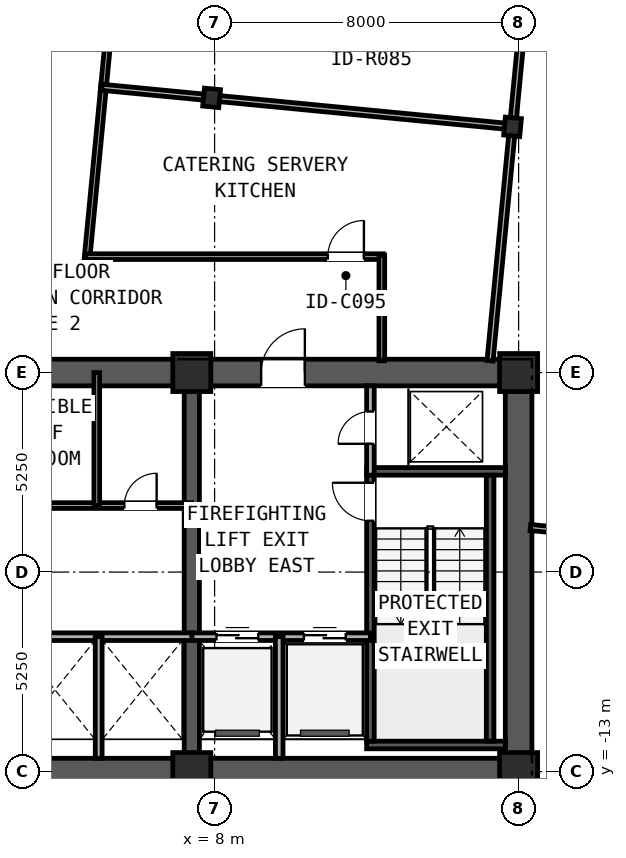
"""IFC4 building model, lengths in metres.
Left out: names, types, materials, properties, quantities, classifications, styles, units other than length and angle.
Written with IfcOpenShell. Run it as: python <this file> out.ifc"""

import sys

from ifc_helpers import new_model, si_unit, direction, frame, frame_2d, origin, origin_2d, place, context, subcontext, project, spatial, rectangle, i_section, extrude, element, fill, save


model = new_model("IFC4")
c1 = context("Model", 3, precision=1e-05, world=origin(), true_north=direction((0.0, 1.0)))
c2 = subcontext(c1, "Body", "Model", "MODEL_VIEW")
j1 = project(units=[si_unit("LENGTHUNIT", "METRE"), si_unit("PLANEANGLEUNIT", "RADIAN")], contexts=[c1])
p1 = place(None, origin())
s1 = spatial("IfcSite", under=j1, at=p1, CompositionType="ELEMENT")
p2 = place(p1, origin())
s2 = spatial("IfcBuilding", under=s1, at=p2, CompositionType="ELEMENT")
p3 = place(p2, frame((0.0, 0.0, 160.05)))
s3 = spatial("IfcBuildingStorey", under=s2, at=p3, CompositionType="ELEMENT", Elevation=160.05)
p4 = place(p3, frame((-16.35, -13.0, 0.0), z_axis=(0.0, 0.0, 1.0), x_axis=(1.0, 0.0, 0.0)))
e1 = element("IfcWall", 1, at=p4, inside=s3, PredefinedType="SHEAR", context=c2, shape_type="SweptSolid", body=[
    extrude(rectangle(XDim=32.7, YDim=0.7, at=frame_2d((16.35, 0.0))), origin(), (0.0, 0.0, 1.0), 2.91),
])
p5 = place(p3, frame((-16.35, -2.5, 0.0), z_axis=(0.0, 0.0, 1.0), x_axis=(1.0, 0.0, 0.0)))
e2 = element("IfcWall", 2, at=p5, inside=s3, PredefinedType="SHEAR", context=c2, shape_type="SweptSolid", body=[
    extrude(rectangle(XDim=32.7, YDim=0.7, at=frame_2d((16.35, 0.0))), origin(), (0.0, 0.0, 1.0), 2.91),
])
p6 = place(p5, frame((5.975, 0.0, 0.0)))
e3 = element("IfcOpeningElement", 3, at=p6, cuts=e2, PredefinedType="OPENING", context=c2, shape_type="SweptSolid", body=[
    extrude(rectangle(XDim=1.15, YDim=2.0, at=frame_2d((0.575, 1.0))), frame((0.0, 0.36, 0.0), z_axis=(0.0, -1.0, 0.0), x_axis=(1.0, 0.0, 0.0)), (0.0, 0.0, 1.0), 0.72),
])
p7 = place(p5, frame((15.55, 0.0, 0.0)))
e4 = element("IfcOpeningElement", 4, at=p7, cuts=e2, PredefinedType="OPENING", context=c2, shape_type="SweptSolid", body=[
    extrude(rectangle(XDim=1.6, YDim=2.0, at=frame_2d((0.8, 1.0))), frame((0.0, 0.36, 0.0), z_axis=(0.0, -1.0, 0.0), x_axis=(1.0, 0.0, 0.0)), (0.0, 0.0, 1.0), 0.72),
])
p8 = place(p5, frame((25.575, 0.0, 0.0)))
e5 = element("IfcOpeningElement", 5, at=p8, cuts=e2, PredefinedType="OPENING", context=c2, shape_type="SweptSolid", body=[
    extrude(rectangle(XDim=1.15, YDim=2.0, at=frame_2d((0.575, 1.0))), frame((0.0, 0.36, 0.0), z_axis=(0.0, -1.0, 0.0), x_axis=(1.0, 0.0, 0.0)), (0.0, 0.0, 1.0), 0.72),
])
p9 = place(p3, frame((16.0, -12.65, 0.0), z_axis=(0.0, 0.0, 1.0), x_axis=(0.0, 1.0, 0.0)))
e6 = element("IfcWall", 6, at=p9, inside=s3, PredefinedType="SHEAR", context=c2, shape_type="SweptSolid", body=[
    extrude(rectangle(XDim=9.8, YDim=0.7, at=frame_2d((4.9, 0.0))), origin(), (0.0, 0.0, 1.0), 2.91),
])
p10 = place(p3, frame((7.4, -12.65, 0.0), z_axis=(0.0, 0.0, 1.0), x_axis=(0.0, 1.0, 0.0)))
e7 = element("IfcWall", 7, at=p10, inside=s3, PredefinedType="SHEAR", context=c2, shape_type="SweptSolid", body=[
    extrude(rectangle(XDim=9.8, YDim=0.4, at=frame_2d((4.9, 0.0))), origin(), (0.0, 0.0, 1.0), 3.19),
])
for number, where, z_axis, x_axis in (
    (8, (12.0, -12.3, 0.0), (0.0, 0.0, 1.0), (1.0, 0.0, 0.0)),
    (9, (12.0, -5.1, 0.0), (0.0, 0.0, 1.0), (1.0, 0.0, 0.0)),
):
    element("IfcWall", number, at=place(p3, frame(where, z_axis=z_axis, x_axis=x_axis)), inside=s3, PredefinedType="SOLIDWALL", context=c2, shape_type="SweptSolid", body=[
        extrude(rectangle(XDim=3.65, YDim=0.2, at=frame_2d((1.825, 0.0))), origin(), (0.0, 0.0, 1.0), 3.19),
    ])
p11 = place(p3, frame((12.1, -12.2, 0.0), z_axis=(0.0, 0.0, 1.0), x_axis=(0.0, 1.0, 0.0)))
e10 = element("IfcWall", 10, at=p11, inside=s3, PredefinedType="SOLIDWALL", context=c2, shape_type="SweptSolid", body=[
    extrude(rectangle(XDim=7.0, YDim=0.2, at=frame_2d((3.5, 0.0))), origin(), (0.0, 0.0, 1.0), 3.19),
])
p12 = place(p11, frame((5.8, 0.0, 0.0)))
e11 = element("IfcOpeningElement", 11, at=p12, cuts=e10, PredefinedType="OPENING", context=c2, shape_type="SweptSolid", body=[
    extrude(rectangle(XDim=1.0, YDim=2.1, at=frame_2d((0.5, 1.05))), frame((0.0, 0.11, 0.0), z_axis=(0.0, -1.0, 0.0), x_axis=(1.0, 0.0, 0.0)), (0.0, 0.0, 1.0), 0.22),
])
p13 = place(p3, frame((15.25, -12.2, 0.0), z_axis=(0.0, 0.0, 1.0), x_axis=(0.0, 1.0, 0.0)))
e12 = element("IfcWall", 12, at=p13, inside=s3, PredefinedType="SOLIDWALL", context=c2, shape_type="SweptSolid", body=[
    extrude(rectangle(XDim=7.0, YDim=0.2, at=frame_2d((3.5, 0.0))), origin(), (0.0, 0.0, 1.0), 3.19),
])
for number, where, z_axis, x_axis in (
    (13, (7.4, -13.0, 0.0), (0.0, 0.0, 1.0), (1.0, 0.0, 0.0)),
    (14, (16.0, -13.0, 0.0), (0.0, 0.0, 1.0), (1.0, 0.0, 0.0)),
    (15, (7.4, -2.5, 0.0), (0.0, 0.0, 1.0), (1.0, 0.0, 0.0)),
    (16, (16.0, -2.5, 0.0), (0.0, 0.0, 1.0), (1.0, 0.0, 0.0)),
):
    element("IfcColumn", number, at=place(p3, frame(where, z_axis=z_axis, x_axis=x_axis)), inside=s3, PredefinedType="COLUMN", context=c2, shape_type="SweptSolid", body=[
        extrude(rectangle(XDim=1.0, YDim=1.0, at=origin_2d()), origin(), (0.0, 0.0, 1.0), 3.45),
    ])
for number, where, z_axis, x_axis in (
    (17, (7.921, 4.728, 0.0), (0.0, 0.0, 1.0), (0.995, -0.096, 0.0)),
    (18, (15.84, 3.965, 0.0), (0.0, 0.0, 1.0), (0.995, -0.096, 0.0)),
):
    element("IfcColumn", number, at=place(p3, frame(where, z_axis=z_axis, x_axis=x_axis)), inside=s3, PredefinedType="COLUMN", context=c2, shape_type="SweptSolid", body=[
        extrude(i_section(OverallWidth=0.424, OverallDepth=0.474, WebThickness=0.048, FlangeThickness=0.077, FilletRadius=0.031, at=origin_2d()), origin(), (0.0, 0.0, 1.0), 3.45),
    ])
p14 = place(p3, frame((-26.695, -13.016, 0.0), z_axis=(0.0, 0.0, 1.0), x_axis=(0.995396268366, -0.095845025554, 0.0)))
e19 = element("IfcWall", 19, at=p14, inside=s3, PredefinedType="STANDARD", context=c2, shape_type="SweptSolid", body=[
    extrude(rectangle(XDim=49.6, YDim=0.24, at=frame_2d((24.8, 0.0))), origin(), (0.0, 0.0, 1.0), 3.19),
])
p15 = place(p14, frame((6.044, 0.0, 0.7)))
e20 = element("IfcOpeningElement", 20, at=p15, cuts=e19, PredefinedType="OPENING", context=c2, shape_type="SweptSolid", body=[
    extrude(rectangle(XDim=1.8, YDim=1.5, at=frame_2d((0.9, 0.75))), frame((0.0, 0.13, 0.0), z_axis=(0.0, -1.0, 0.0), x_axis=(1.0, 0.0, 0.0)), (0.0, 0.0, 1.0), 0.26),
])
p16 = place(p14, frame((41.756, 0.0, 0.7)))
e21 = element("IfcOpeningElement", 21, at=p16, cuts=e19, PredefinedType="OPENING", context=c2, shape_type="SweptSolid", body=[
    extrude(rectangle(XDim=1.8, YDim=1.5, at=frame_2d((0.9, 0.75))), frame((0.0, 0.13, 0.0), z_axis=(0.0, -1.0, 0.0), x_axis=(1.0, 0.0, 0.0)), (0.0, 0.0, 1.0), 0.26),
])
p17 = place(p3, frame((12.1, -5.2, 0.0), z_axis=(0.0, 0.0, 1.0), x_axis=(0.0, 1.0, 0.0)))
e22 = element("IfcWall", 22, at=p17, inside=s3, PredefinedType="PARTITIONING", context=c2, shape_type="SweptSolid", body=[
    extrude(rectangle(XDim=2.35, YDim=0.2, at=frame_2d((1.175, 0.0))), origin(), (0.0, 0.0, 1.0), 2.225),
])
p18 = place(p17, frame((0.825, 0.0, 0.0)))
e23 = element("IfcOpeningElement", 23, at=p18, cuts=e22, PredefinedType="OPENING", context=c2, shape_type="SweptSolid", body=[
    extrude(rectangle(XDim=0.85, YDim=2.05, at=frame_2d((0.425, 1.025))), frame((0.0, 0.11, 0.0), z_axis=(0.0, -1.0, 0.0), x_axis=(1.0, 0.0, 0.0)), (0.0, 0.0, 1.0), 0.22),
])
p19 = place(p3, frame((7.4, -9.45, 0.0), z_axis=(0.0, 0.0, 1.0), x_axis=(1.0, 0.0, 0.0)))
e24 = element("IfcWall", 24, at=p19, inside=s3, PredefinedType="PARTITIONING", context=c2, shape_type="SweptSolid", body=[
    extrude(rectangle(XDim=4.7, YDim=0.2, at=frame_2d((2.35, 0.0))), origin(), (0.0, 0.0, 1.0), 3.19),
])
p20 = place(p19, frame((2.95, 0.0, 0.0)))
e25 = element("IfcOpeningElement", 25, at=p20, cuts=e24, PredefinedType="OPENING", context=c2, shape_type="SweptSolid", body=[
    extrude(rectangle(XDim=1.1, YDim=2.2, at=frame_2d((0.55, 1.1))), frame((0.0, 0.11, 0.0), z_axis=(0.0, -1.0, 0.0), x_axis=(1.0, 0.0, 0.0)), (0.0, 0.0, 1.0), 0.22),
])
p21 = place(p19, frame((0.65, 0.0, 0.0)))
e26 = element("IfcOpeningElement", 26, at=p21, cuts=e24, PredefinedType="OPENING", context=c2, shape_type="SweptSolid", body=[
    extrude(rectangle(XDim=1.1, YDim=2.2, at=frame_2d((0.55, 1.1))), frame((0.0, 0.11, 0.0), z_axis=(0.0, -1.0, 0.0), x_axis=(1.0, 0.0, 0.0)), (0.0, 0.0, 1.0), 0.22),
])
p22 = place(p3, frame((9.7, -12.65, 0.0), z_axis=(0.0, 0.0, 1.0), x_axis=(0.0, 1.0, 0.0)))
e27 = element("IfcWall", 27, at=p22, inside=s3, PredefinedType="PARTITIONING", context=c2, shape_type="SweptSolid", body=[
    extrude(rectangle(XDim=3.2, YDim=0.2, at=frame_2d((1.6, 0.0))), origin(), (0.0, 0.0, 1.0), 2.225),
])
p23 = place(p3, frame((2.55, -9.45, 0.0), z_axis=(0.0, 0.0, 1.0), x_axis=(1.0, 0.0, 0.0)))
e28 = element("IfcWall", 28, at=p23, inside=s3, PredefinedType="PARTITIONING", context=c2, shape_type="SweptSolid", body=[
    extrude(rectangle(XDim=4.85, YDim=0.2, at=frame_2d((2.425, 0.0))), origin(), (0.0, 0.0, 1.0), 3.19),
])
p24 = place(p3, frame((4.95, -12.65, 0.0), z_axis=(0.0, 0.0, 1.0), x_axis=(0.0, 1.0, 0.0)))
e29 = element("IfcWall", 29, at=p24, inside=s3, PredefinedType="PARTITIONING", context=c2, shape_type="SweptSolid", body=[
    extrude(rectangle(XDim=3.2, YDim=0.18, at=frame_2d((1.6, 0.0))), origin(), (0.0, 0.0, 1.0), 2.225),
])
p25 = place(p3, frame((1.6, -6.0, 0.0), z_axis=(0.0, 0.0, 1.0), x_axis=(1.0, 0.0, 0.0)))
e30 = element("IfcWall", 30, at=p25, inside=s3, PredefinedType="PARTITIONING", context=c2, shape_type="SweptSolid", body=[
    extrude(rectangle(XDim=5.8, YDim=0.15, at=frame_2d((2.9, 0.0))), origin(), (0.0, 0.0, 1.0), 3.19),
])
p26 = place(p25, frame((1.2, 0.0, 0.0)))
e31 = element("IfcOpeningElement", 31, at=p26, cuts=e30, PredefinedType="OPENING", context=c2, shape_type="SweptSolid", body=[
    extrude(rectangle(XDim=0.9, YDim=2.1, at=frame_2d((0.45, 1.05))), frame((0.0, 0.085, 0.0), z_axis=(0.0, -1.0, 0.0), x_axis=(1.0, 0.0, 0.0)), (0.0, 0.0, 1.0), 0.17),
])
p27 = place(p25, frame((4.025, 0.0, 0.0)))
e32 = element("IfcOpeningElement", 32, at=p27, cuts=e30, PredefinedType="OPENING", context=c2, shape_type="SweptSolid", body=[
    extrude(rectangle(XDim=0.85, YDim=2.05, at=frame_2d((0.425, 1.025))), frame((0.0, 0.085, 0.0), z_axis=(0.0, -1.0, 0.0), x_axis=(1.0, 0.0, 0.0)), (0.0, 0.0, 1.0), 0.17),
])
p28 = place(p3, frame((4.9, -6.0, 0.0), z_axis=(0.0, 0.0, 1.0), x_axis=(0.0, 1.0, 0.0)))
e33 = element("IfcWall", 33, at=p28, inside=s3, PredefinedType="PARTITIONING", context=c2, shape_type="SweptSolid", body=[
    extrude(rectangle(XDim=3.5, YDim=0.15, at=frame_2d((1.75, 0.0))), origin(), (0.0, 0.0, 1.0), 2.225),
])
p29 = place(p3, frame((5.314, 7.48, 0.0), z_axis=(0.0, 0.0, 1.0), x_axis=(-0.09587519517, -0.995393362923, 0.0)))
e34 = element("IfcWall", 34, at=p29, inside=s3, PredefinedType="PARTITIONING", context=c2, shape_type="SweptSolid", body=[
    extrude(rectangle(XDim=2.572, YDim=0.15, at=frame_2d((1.286, 0.0))), origin(), (0.0, 0.0, 1.0), 2.479),
])
p30 = place(p3, frame((5.084, 5.083, 0.0), z_axis=(0.0, 0.0, 1.0), x_axis=(-0.095867331855, -0.995394120277, 0.0)))
e35 = element("IfcWall", 35, at=p30, inside=s3, PredefinedType="PARTITIONING", context=c2, shape_type="SweptSolid", body=[
    extrude(rectangle(XDim=4.594, YDim=0.15, at=frame_2d((2.297, 0.0))), origin(), (0.0, 0.0, 1.0), 2.479),
])
p31 = place(p3, frame((4.607, 0.55, 0.0), z_axis=(0.0, 0.0, 1.0), x_axis=(1.0, 0.0, 0.0)))
e36 = element("IfcWall", 36, at=p31, inside=s3, PredefinedType="PARTITIONING", context=c2, shape_type="SweptSolid", body=[
    extrude(rectangle(XDim=7.833, YDim=0.15, at=frame_2d((3.917, 0.0))), origin(), (0.0, 0.0, 1.0), 2.479),
])
p32 = place(p31, frame((6.372, 0.0, 0.0)))
e37 = element("IfcOpeningElement", 37, at=p32, cuts=e36, PredefinedType="OPENING", context=c2, shape_type="SweptSolid", body=[
    extrude(rectangle(XDim=0.95, YDim=2.15, at=frame_2d((0.475, 1.075))), frame((0.0, 0.085, 0.0), z_axis=(0.0, -1.0, 0.0), x_axis=(1.0, 0.0, 0.0)), (0.0, 0.0, 1.0), 0.17),
])
p33 = place(p3, frame((12.4, 0.59, 0.0), z_axis=(0.0, 0.0, 1.0), x_axis=(0.0, -1.0, 0.0)))
e38 = element("IfcWall", 38, at=p33, inside=s3, PredefinedType="PARTITIONING", context=c2, shape_type="SweptSolid", body=[
    extrude(rectangle(XDim=2.78, YDim=0.15, at=frame_2d((1.39, 0.0))), origin(), (0.0, 0.0, 1.0), 2.225),
])
p34 = place(p3, frame((7.745, 4.745, 0.0), z_axis=(0.0, 0.0, 1.0), x_axis=(-0.995392910691, 0.095879890208, 0.0)))
e39 = element("IfcWall", 39, at=p34, inside=s3, PredefinedType="PARTITIONING", context=c2, shape_type="SweptSolid", body=[
    extrude(rectangle(XDim=2.722, YDim=0.16, at=frame_2d((1.361, 0.0))), origin(), (0.0, 0.0, 1.0), 2.479),
])
p35 = place(p3, frame((15.665, 3.982, 0.0), z_axis=(0.0, 0.0, 1.0), x_axis=(-0.995396667246, 0.095840882902, 0.0)))
e40 = element("IfcWall", 40, at=p35, inside=s3, PredefinedType="PARTITIONING", context=c2, shape_type="SweptSolid", body=[
    extrude(rectangle(XDim=7.604, YDim=0.16, at=frame_2d((3.802, 0.0))), origin(), (0.0, 0.0, 1.0), 2.479),
])
p36 = place(p3, frame((16.079, 6.444, 0.0), z_axis=(0.0, 0.0, 1.0), x_axis=(-0.095794827695, -0.995401100555, 0.0)))
e41 = element("IfcWall", 41, at=p36, inside=s3, PredefinedType="PARTITIONING", context=c2, shape_type="SweptSolid", body=[
    extrude(rectangle(XDim=2.314, YDim=0.16, at=frame_2d((1.157, 0.0))), origin(), (0.0, 0.0, 1.0), 2.479),
])
p37 = place(p3, frame((15.823, 3.79, 0.0), z_axis=(0.0, 0.0, 1.0), x_axis=(-0.095865726078, -0.99539427493, 0.0)))
e42 = element("IfcWall", 42, at=p37, inside=s3, PredefinedType="PARTITIONING", context=c2, shape_type="SweptSolid", body=[
    extrude(rectangle(XDim=6.008, YDim=0.16, at=frame_2d((3.004, 0.0))), origin(), (0.0, 0.0, 1.0), 2.225),
])
p38 = place(p3, frame((25.796, -7.492, 0.0), z_axis=(0.0, 0.0, 1.0), x_axis=(-0.995396487733, 0.095842747294, 0.0)))
e43 = element("IfcWall", 43, at=p38, inside=s3, PredefinedType="PARTITIONING", context=c2, shape_type="SweptSolid", body=[
    extrude(rectangle(XDim=9.53, YDim=0.16, at=frame_2d((4.765, 0.0))), origin(), (0.0, 0.0, 1.0), 2.225),
])
p39 = place(p12, origin())
e44 = element("IfcDoor", 44, at=p39, inside=s3, OperationType="SINGLE_SWING_RIGHT", PredefinedType="DOOR", context=c2, shape_type="SweptSolid", body=[
    extrude(rectangle(XDim=1.0, YDim=2.1, at=frame_2d((0.5, 1.05))), frame((0.0, 0.025, 0.0), z_axis=(0.0, -1.0, 0.0), x_axis=(1.0, 0.0, 0.0)), (0.0, 0.0, 1.0), 0.05),
])
fill(e11, e44)
p40 = place(p18, frame((0.85, 0.0, 0.0), z_axis=(0.0, 0.0, 1.0), x_axis=(-1.0, 0.0, 0.0)))
e45 = element("IfcDoor", 45, at=p40, inside=s3, OperationType="SINGLE_SWING_LEFT", PredefinedType="DOOR", context=c2, shape_type="SweptSolid", body=[
    extrude(rectangle(XDim=0.85, YDim=2.05, at=frame_2d((0.425, 1.025))), frame((0.0, 0.025, 0.0), z_axis=(0.0, -1.0, 0.0), x_axis=(1.0, 0.0, 0.0)), (0.0, 0.0, 1.0), 0.05),
])
fill(e23, e45)
p41 = place(p20, origin())
e46 = element("IfcDoor", 46, at=p41, inside=s3, OperationType="SLIDING_TO_LEFT", PredefinedType="DOOR", context=c2, shape_type="SweptSolid", body=[
    extrude(rectangle(XDim=1.1, YDim=2.2, at=frame_2d((0.55, 1.1))), frame((0.0, 0.025, 0.0), z_axis=(0.0, -1.0, 0.0), x_axis=(1.0, 0.0, 0.0)), (0.0, 0.0, 1.0), 0.05),
])
fill(e25, e46)
p42 = place(p21, origin())
e47 = element("IfcDoor", 47, at=p42, inside=s3, OperationType="SLIDING_TO_RIGHT", PredefinedType="DOOR", context=c2, shape_type="SweptSolid", body=[
    extrude(rectangle(XDim=1.1, YDim=2.2, at=frame_2d((0.55, 1.1))), frame((0.0, 0.025, 0.0), z_axis=(0.0, -1.0, 0.0), x_axis=(1.0, 0.0, 0.0)), (0.0, 0.0, 1.0), 0.05),
])
fill(e26, e47)
p43 = place(p8, origin())
e48 = element("IfcDoor", 48, at=p43, inside=s3, OperationType="SINGLE_SWING_RIGHT", PredefinedType="DOOR", context=c2, shape_type="SweptSolid", body=[
    extrude(rectangle(XDim=1.15, YDim=2.0, at=frame_2d((0.575, 1.0))), frame((0.0, 0.025, 0.0), z_axis=(0.0, -1.0, 0.0), x_axis=(1.0, 0.0, 0.0)), (0.0, 0.0, 1.0), 0.05),
])
fill(e5, e48)
p44 = place(p27, frame((0.85, 0.0, 0.0), z_axis=(0.0, 0.0, 1.0), x_axis=(-1.0, 0.0, 0.0)))
e49 = element("IfcDoor", 49, at=p44, inside=s3, OperationType="SINGLE_SWING_RIGHT", PredefinedType="DOOR", context=c2, shape_type="SweptSolid", body=[
    extrude(rectangle(XDim=0.85, YDim=2.05, at=frame_2d((0.425, 1.025))), frame((0.0, 0.025, 0.0), z_axis=(0.0, -1.0, 0.0), x_axis=(1.0, 0.0, 0.0)), (0.0, 0.0, 1.0), 0.05),
])
fill(e32, e49)
p45 = place(p32, origin())
e50 = element("IfcDoor", 50, at=p45, inside=s3, OperationType="SINGLE_SWING_RIGHT", PredefinedType="DOOR", context=c2, shape_type="SweptSolid", body=[
    extrude(rectangle(XDim=0.95, YDim=2.15, at=frame_2d((0.475, 1.075))), frame((0.0, 0.025, 0.0), z_axis=(0.0, -1.0, 0.0), x_axis=(1.0, 0.0, 0.0)), (0.0, 0.0, 1.0), 0.05),
])
fill(e37, e50)
save(model, sys.argv[1])
